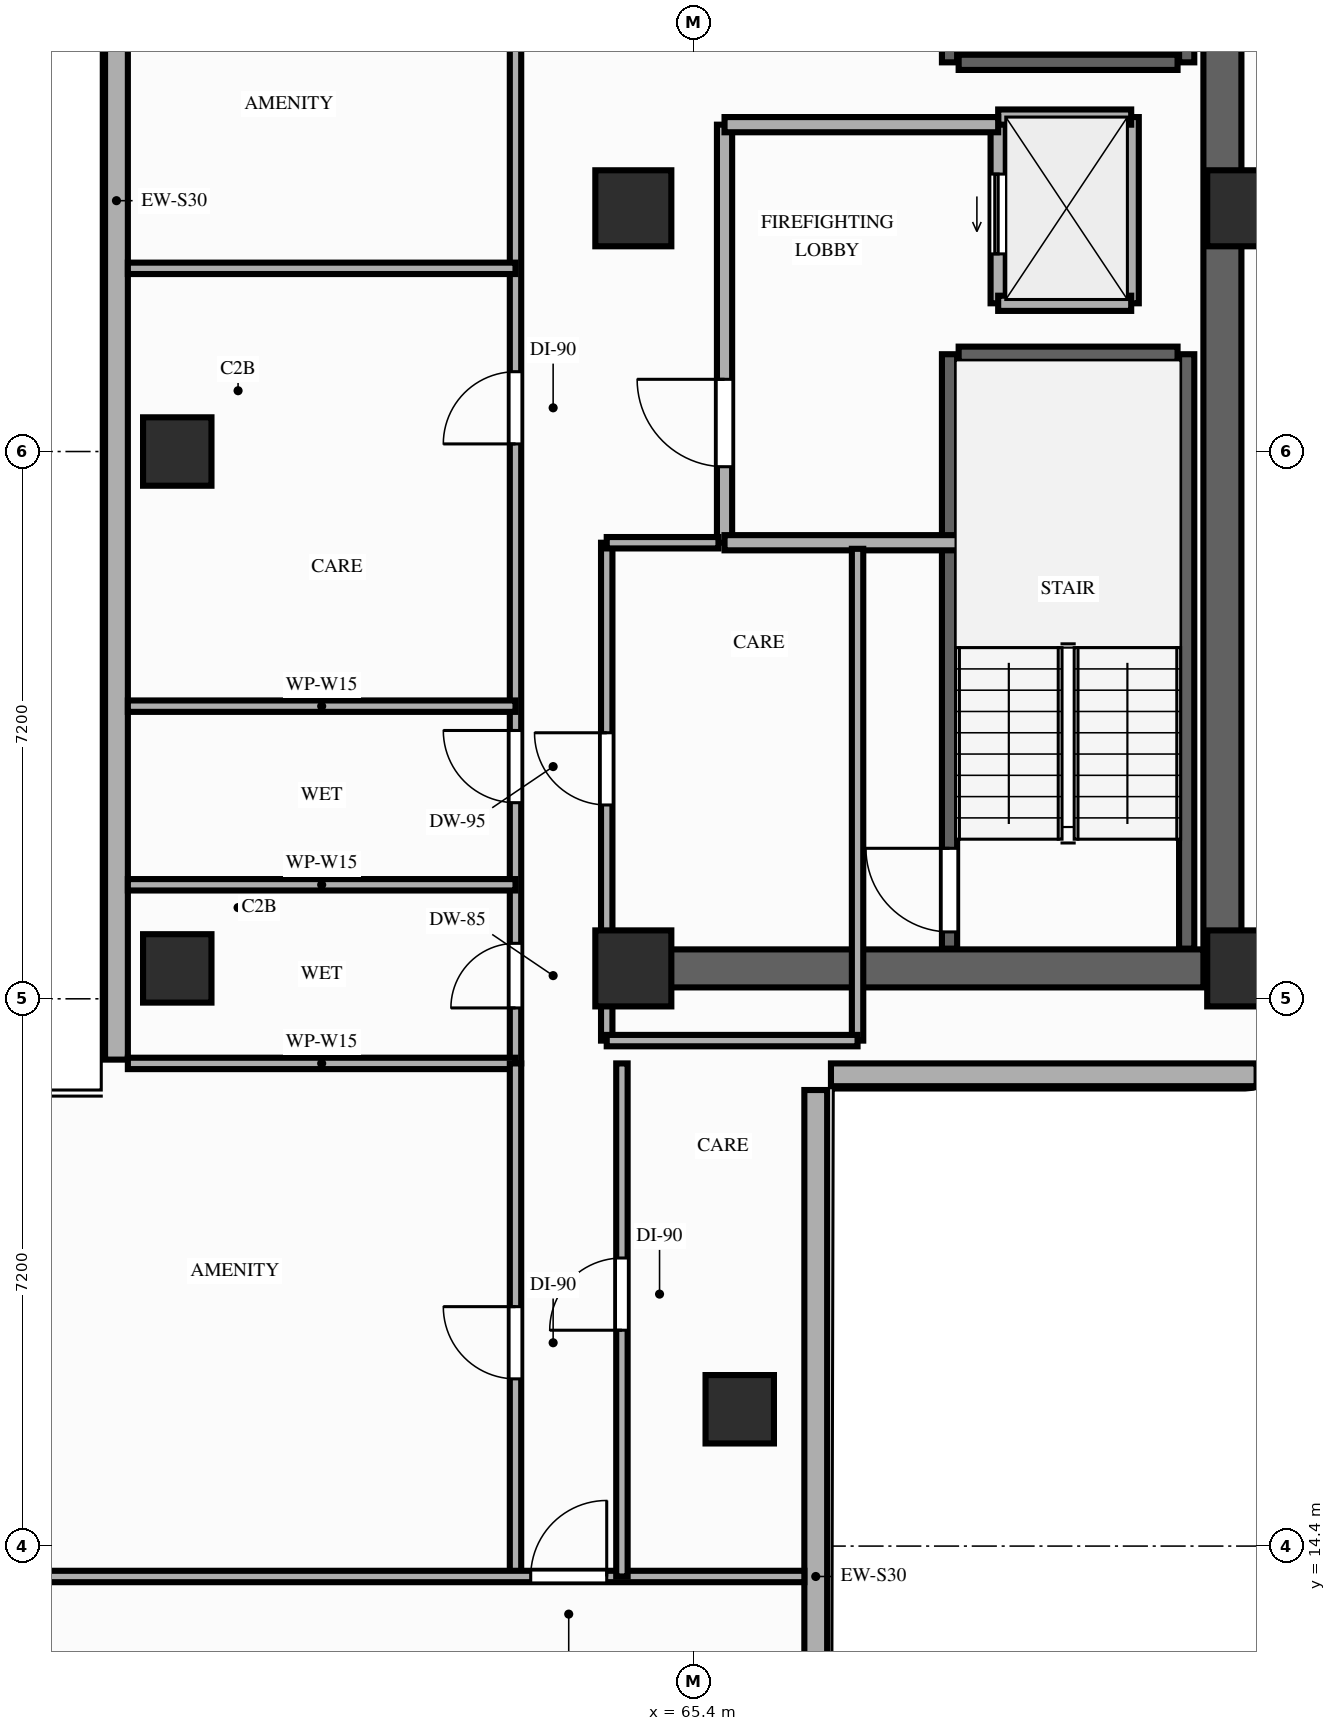
"""IFC4 building model, lengths in metres.
Left out: names, types, materials, properties, quantities, classifications, styles, units other than length and angle.
Written with IfcOpenShell. Run it as: python <this file> out.ifc"""

import sys

from ifc_helpers import new_model, si_unit, direction, frame, frame_2d, origin, origin_2d, place, context, subcontext, project, spatial, rectangle, extrude, element, fill, save


model = new_model("IFC4")
c1 = context("Model", 3, precision=1e-05, world=origin(), true_north=direction((0.0, 1.0)))
c2 = subcontext(c1, "Body", "Model", "MODEL_VIEW")
j1 = project(units=[si_unit("LENGTHUNIT", "METRE"), si_unit("PLANEANGLEUNIT", "RADIAN")], contexts=[c1])
p1 = place(None, origin())
s1 = spatial("IfcSite", under=j1, at=p1, CompositionType="ELEMENT")
p2 = place(p1, origin())
s2 = spatial("IfcBuilding", under=s1, at=p2, CompositionType="ELEMENT")
p3 = place(p2, frame((0.0, 0.0, 72.4)))
s3 = spatial("IfcBuildingStorey", under=s2, at=p3, CompositionType="ELEMENT", Elevation=72.4)
for number, where, z_axis, x_axis in (
    (1, (64.6, 22.0, 0.0), (0.0, 0.0, 1.0), (1.0, 0.0, 0.0)),
    (2, (72.65, 22.0, 0.0), (0.0, 0.0, 1.0), (1.0, 0.0, 0.0)),
    (3, (64.6, 32.0, 0.0), (0.0, 0.0, 1.0), (1.0, 0.0, 0.0)),
    (4, (72.65, 32.0, 0.0), (0.0, 0.0, 1.0), (1.0, 0.0, 0.0)),
):
    element("IfcColumn", number, at=place(p3, frame(where, z_axis=z_axis, x_axis=x_axis)), inside=s3, PredefinedType="COLUMN", context=c2, shape_type="SweptSolid", body=[
        extrude(rectangle(XDim=1.0, YDim=1.0, at=origin_2d()), origin(), (0.0, 0.0, 1.0), 3.2),
    ])
for number, where, z_axis, x_axis in (
    (5, (58.6, 22.0, 0.0), (0.0, 0.0, 1.0), (1.0, 0.0, 0.0)),
    (6, (58.6, 28.8, 0.0), (0.0, 0.0, 1.0), (1.0, 0.0, 0.0)),
    (7, (66.0, 16.2, 0.0), (0.0, 0.0, 1.0), (1.0, 0.0, 0.0)),
):
    element("IfcColumn", number, at=place(p3, frame(where, z_axis=z_axis, x_axis=x_axis)), inside=s3, PredefinedType="COLUMN", context=c2, shape_type="SweptSolid", body=[
        extrude(rectangle(XDim=0.9, YDim=0.9, at=origin_2d()), origin(), (0.0, 0.0, 1.0), 3.2),
    ])
p4 = place(p3, frame((57.8, 43.4, 0.0), z_axis=(0.0, 0.0, 1.0), x_axis=(0.0, -1.0, 0.0)))
e8 = element("IfcWall", 8, at=p4, inside=s3, PredefinedType="STANDARD", context=c2, shape_type="SweptSolid", body=[
    extrude(rectangle(XDim=22.6, YDim=0.3, at=frame_2d((11.3, 0.0))), origin(), (0.0, 0.0, 1.0), 2.54),
])
p5 = place(p3, frame((67.0, 7.6, 0.0), z_axis=(0.0, 0.0, 1.0), x_axis=(0.0, 1.0, 0.0)))
e9 = element("IfcWall", 9, at=p5, inside=s3, PredefinedType="STANDARD", context=c2, shape_type="SweptSolid", body=[
    extrude(rectangle(XDim=12.8, YDim=0.3, at=frame_2d((6.4, 0.0))), origin(), (0.0, 0.0, 1.0), 2.96),
])
p6 = place(p3, frame((67.2, 20.6, 0.0), z_axis=(0.0, 0.0, 1.0), x_axis=(1.0, 0.0, 0.0)))
e10 = element("IfcWall", 10, at=p6, inside=s3, PredefinedType="STANDARD", context=c2, shape_type="SweptSolid", body=[
    extrude(rectangle(XDim=5.6, YDim=0.3, at=frame_2d((2.8, 0.0))), origin(), (0.0, 0.0, 1.0), 2.96),
])
p7 = place(p3, frame((72.35, 22.0, 0.0), z_axis=(0.0, 0.0, 1.0), x_axis=(0.0, 1.0, 0.0)))
e11 = element("IfcWall", 11, at=p7, inside=s3, PredefinedType="SHEAR", context=c2, shape_type="SweptSolid", body=[
    extrude(rectangle(XDim=20.25, YDim=0.5, at=frame_2d((10.125, 0.0))), origin(), (0.0, 0.0, 1.0), 2.96),
])
p8 = place(p3, frame((64.6, 22.0, 0.0), z_axis=(0.0, 0.0, 1.0), x_axis=(1.0, 0.0, 0.0)))
e12 = element("IfcWall", 12, at=p8, inside=s3, PredefinedType="SHEAR", context=c2, shape_type="SweptSolid", body=[
    extrude(rectangle(XDim=7.5, YDim=0.5, at=frame_2d((3.75, 0.0))), origin(), (0.0, 0.0, 1.0), 2.96),
])
p9 = place(p3, frame((68.76, 22.26, 0.0), z_axis=(0.0, 0.0, 1.0), x_axis=(0.0, 1.0, 0.0)))
e13 = element("IfcWall", 13, at=p9, inside=s3, PredefinedType="SHEAR", context=c2, shape_type="SweptSolid", body=[
    extrude(rectangle(XDim=7.82, YDim=0.2, at=frame_2d((3.91, 0.0))), origin(), (0.0, 0.0, 1.0), 2.96),
])
p10 = place(p9, frame((0.22, 0.0, 0.0)))
e14 = element("IfcOpeningElement", 14, at=p10, cuts=e13, PredefinedType="OPENING", context=c2, shape_type="SweptSolid", body=[
    extrude(rectangle(XDim=1.1, YDim=2.15, at=frame_2d((0.55, 1.075))), frame((0.0, 0.11, 0.0), z_axis=(0.0, -1.0, 0.0), x_axis=(1.0, 0.0, 0.0)), (0.0, 0.0, 1.0), 0.22),
])
p11 = place(p3, frame((71.88, 22.26, 0.0), z_axis=(0.0, 0.0, 1.0), x_axis=(0.0, 1.0, 0.0)))
e15 = element("IfcWall", 15, at=p11, inside=s3, PredefinedType="SHEAR", context=c2, shape_type="SweptSolid", body=[
    extrude(rectangle(XDim=7.82, YDim=0.2, at=frame_2d((3.91, 0.0))), origin(), (0.0, 0.0, 1.0), 2.96),
])
p12 = place(p3, frame((68.88, 30.08, 0.0), z_axis=(0.0, 0.0, 1.0), x_axis=(1.0, 0.0, 0.0)))
e16 = element("IfcWall", 16, at=p12, inside=s3, PredefinedType="SHEAR", context=c2, shape_type="SweptSolid", body=[
    extrude(rectangle(XDim=2.88, YDim=0.2, at=frame_2d((1.44, 0.0))), origin(), (0.0, 0.0, 1.0), 2.96),
])
p13 = place(p3, frame((68.76, 33.92, 0.0), z_axis=(0.0, 0.0, 1.0), x_axis=(0.0, 1.0, 0.0)))
e17 = element("IfcWall", 17, at=p13, inside=s3, PredefinedType="SHEAR", context=c2, shape_type="SweptSolid", body=[
    extrude(rectangle(XDim=7.96, YDim=0.2, at=frame_2d((3.98, 0.0))), origin(), (0.0, 0.0, 1.0), 2.96),
])
p14 = place(p13, frame((0.22, 0.0, 0.0)))
e18 = element("IfcOpeningElement", 18, at=p14, cuts=e17, PredefinedType="OPENING", context=c2, shape_type="SweptSolid", body=[
    extrude(rectangle(XDim=1.1, YDim=2.15, at=frame_2d((0.55, 1.075))), frame((0.0, 0.11, 0.0), z_axis=(0.0, -1.0, 0.0), x_axis=(1.0, 0.0, 0.0)), (0.0, 0.0, 1.0), 0.22),
])
p15 = place(p3, frame((71.88, 33.92, 0.0), z_axis=(0.0, 0.0, 1.0), x_axis=(0.0, 1.0, 0.0)))
e19 = element("IfcWall", 19, at=p15, inside=s3, PredefinedType="SHEAR", context=c2, shape_type="SweptSolid", body=[
    extrude(rectangle(XDim=7.96, YDim=0.2, at=frame_2d((3.98, 0.0))), origin(), (0.0, 0.0, 1.0), 2.96),
])
p16 = place(p3, frame((68.88, 33.92, 0.0), z_axis=(0.0, 0.0, 1.0), x_axis=(1.0, 0.0, 0.0)))
e20 = element("IfcWall", 20, at=p16, inside=s3, PredefinedType="SHEAR", context=c2, shape_type="SweptSolid", body=[
    extrude(rectangle(XDim=2.88, YDim=0.2, at=frame_2d((1.44, 0.0))), origin(), (0.0, 0.0, 1.0), 2.96),
])
p17 = place(p3, frame((69.4, 30.75, 0.0), z_axis=(0.0, 0.0, 1.0), x_axis=(0.0, 1.0, 0.0)))
e21 = element("IfcWall", 21, at=p17, inside=s3, PredefinedType="MOVABLE", context=c2, shape_type="SweptSolid", body=[
    extrude(rectangle(XDim=2.45, YDim=0.2, at=frame_2d((1.225, 0.0))), origin(), (0.0, 0.0, 1.0), 2.96),
])
p18 = place(p17, frame((0.65, 0.0, 0.0)))
e22 = element("IfcOpeningElement", 22, at=p18, cuts=e21, PredefinedType="OPENING", context=c2, shape_type="SweptSolid", body=[
    extrude(rectangle(XDim=1.05, YDim=2.15, at=frame_2d((0.525, 1.075))), frame((0.0, 0.11, 0.0), z_axis=(0.0, -1.0, 0.0), x_axis=(1.0, 0.0, 0.0)), (0.0, 0.0, 1.0), 0.22),
])
p19 = place(p3, frame((71.15, 30.75, 0.0), z_axis=(0.0, 0.0, 1.0), x_axis=(0.0, 1.0, 0.0)))
e23 = element("IfcWall", 23, at=p19, inside=s3, PredefinedType="MOVABLE", context=c2, shape_type="SweptSolid", body=[
    extrude(rectangle(XDim=2.45, YDim=0.2, at=frame_2d((1.225, 0.0))), origin(), (0.0, 0.0, 1.0), 2.96),
])
for number, where, z_axis, x_axis in (
    (24, (69.4, 33.2, 0.0), (0.0, 0.0, 1.0), (1.0, 0.0, 0.0)),
    (25, (69.4, 30.75, 0.0), (0.0, 0.0, 1.0), (1.0, 0.0, 0.0)),
):
    element("IfcWall", number, at=place(p3, frame(where, z_axis=z_axis, x_axis=x_axis)), inside=s3, PredefinedType="MOVABLE", context=c2, shape_type="SweptSolid", body=[
        extrude(rectangle(XDim=1.75, YDim=0.2, at=frame_2d((0.875, 0.0))), origin(), (0.0, 0.0, 1.0), 2.96),
    ])
p20 = place(p3, frame((65.8, 27.6, 0.0), z_axis=(0.0, 0.0, 1.0), x_axis=(0.0, 1.0, 0.0)))
e26 = element("IfcWall", 26, at=p20, inside=s3, PredefinedType="PARTITIONING", context=c2, shape_type="SweptSolid", body=[
    extrude(rectangle(XDim=5.5, YDim=0.2, at=frame_2d((2.75, 0.0))), origin(), (0.0, 0.0, 1.0), 2.96),
])
p21 = place(p20, frame((1.0, 0.0, 0.0)))
e27 = element("IfcOpeningElement", 27, at=p21, cuts=e26, PredefinedType="OPENING", context=c2, shape_type="SweptSolid", body=[
    extrude(rectangle(XDim=1.15, YDim=2.15, at=frame_2d((0.575, 1.075))), frame((0.0, 0.11, 0.0), z_axis=(0.0, -1.0, 0.0), x_axis=(1.0, 0.0, 0.0)), (0.0, 0.0, 1.0), 0.22),
])
p22 = place(p3, frame((65.8, 33.1, 0.0), z_axis=(0.0, 0.0, 1.0), x_axis=(1.0, 0.0, 0.0)))
e28 = element("IfcWall", 28, at=p22, inside=s3, PredefinedType="PARTITIONING", context=c2, shape_type="SweptSolid", body=[
    extrude(rectangle(XDim=3.6, YDim=0.2, at=frame_2d((1.8, 0.0))), origin(), (0.0, 0.0, 1.0), 2.96),
])
p23 = place(p3, frame((65.8, 27.6, 0.0), z_axis=(0.0, 0.0, 1.0), x_axis=(1.0, 0.0, 0.0)))
e29 = element("IfcWall", 29, at=p23, inside=s3, PredefinedType="PARTITIONING", context=c2, shape_type="SweptSolid", body=[
    extrude(rectangle(XDim=3.4, YDim=0.2, at=frame_2d((1.7, 0.0))), origin(), (0.0, 0.0, 1.0), 2.96),
])
p24 = place(p3, frame((64.25, 21.05, 0.0), z_axis=(0.0, 0.0, 1.0), x_axis=(0.0, 1.0, 0.0)))
e30 = element("IfcWall", 30, at=p24, inside=s3, PredefinedType="PARTITIONING", context=c2, shape_type="SweptSolid", body=[
    extrude(rectangle(XDim=6.55, YDim=0.15, at=frame_2d((3.275, 0.0))), origin(), (0.0, 0.0, 1.0), 2.54),
])
p25 = place(p24, frame((3.1, 0.0, 0.0)))
e31 = element("IfcOpeningElement", 31, at=p25, cuts=e30, PredefinedType="OPENING", context=c2, shape_type="SweptSolid", body=[
    extrude(rectangle(XDim=0.95, YDim=2.15, at=frame_2d((0.475, 1.075))), frame((0.0, 0.085, 0.0), z_axis=(0.0, -1.0, 0.0), x_axis=(1.0, 0.0, 0.0)), (0.0, 0.0, 1.0), 0.17),
])
p26 = place(p3, frame((67.55, 21.05, 0.0), z_axis=(0.0, 0.0, 1.0), x_axis=(0.0, 1.0, 0.0)))
e32 = element("IfcWall", 32, at=p26, inside=s3, PredefinedType="PARTITIONING", context=c2, shape_type="SweptSolid", body=[
    extrude(rectangle(XDim=6.47, YDim=0.15, at=frame_2d((3.235, 0.0))), origin(), (0.0, 0.0, 1.0), 2.54),
])
p27 = place(p3, frame((64.25, 21.05, 0.0), z_axis=(0.0, 0.0, 1.0), x_axis=(1.0, 0.0, 0.0)))
e33 = element("IfcWall", 33, at=p27, inside=s3, PredefinedType="PARTITIONING", context=c2, shape_type="SweptSolid", body=[
    extrude(rectangle(XDim=3.3, YDim=0.15, at=frame_2d((1.65, 0.0))), origin(), (0.0, 0.0, 1.0), 2.54),
])
p28 = place(p3, frame((64.25, 27.6, 0.0), z_axis=(0.0, 0.0, 1.0), x_axis=(1.0, 0.0, 0.0)))
e34 = element("IfcWall", 34, at=p28, inside=s3, PredefinedType="PARTITIONING", context=c2, shape_type="SweptSolid", body=[
    extrude(rectangle(XDim=1.47, YDim=0.15, at=frame_2d((0.735, 0.0))), origin(), (0.0, 0.0, 1.0), 2.54),
])
p29 = place(p3, frame((63.05, 20.75, 0.0), z_axis=(0.0, 0.0, 1.0), x_axis=(0.0, 1.0, 0.0)))
e35 = element("IfcWall", 35, at=p29, inside=s3, PredefinedType="PARTITIONING", context=c2, shape_type="SweptSolid", body=[
    extrude(rectangle(XDim=22.7, YDim=0.15, at=frame_2d((11.35, 0.0))), origin(), (0.0, 0.0, 1.0), 2.54),
])
p30 = place(p29, frame((0.73, 0.0, 0.0)))
e36 = element("IfcOpeningElement", 36, at=p30, cuts=e35, PredefinedType="OPENING", context=c2, shape_type="SweptSolid", body=[
    extrude(rectangle(XDim=0.85, YDim=2.1, at=frame_2d((0.425, 1.05))), frame((0.0, 0.085, 0.0), z_axis=(0.0, -1.0, 0.0), x_axis=(1.0, 0.0, 0.0)), (0.0, 0.0, 1.0), 0.17),
])
p31 = place(p29, frame((3.43, 0.0, 0.0)))
e37 = element("IfcOpeningElement", 37, at=p31, cuts=e35, PredefinedType="OPENING", context=c2, shape_type="SweptSolid", body=[
    extrude(rectangle(XDim=0.95, YDim=2.1, at=frame_2d((0.475, 1.05))), frame((0.0, 0.085, 0.0), z_axis=(0.0, -1.0, 0.0), x_axis=(1.0, 0.0, 0.0)), (0.0, 0.0, 1.0), 0.17),
])
p32 = place(p29, frame((8.15, 0.0, 0.0)))
e38 = element("IfcOpeningElement", 38, at=p32, cuts=e35, PredefinedType="OPENING", context=c2, shape_type="SweptSolid", body=[
    extrude(rectangle(XDim=0.95, YDim=2.15, at=frame_2d((0.475, 1.075))), frame((0.0, 0.085, 0.0), z_axis=(0.0, -1.0, 0.0), x_axis=(1.0, 0.0, 0.0)), (0.0, 0.0, 1.0), 0.17),
])
p33 = place(p29, frame((13.67, 0.0, 0.0)))
e39 = element("IfcOpeningElement", 39, at=p33, cuts=e35, PredefinedType="OPENING", context=c2, shape_type="SweptSolid", body=[
    extrude(rectangle(XDim=0.95, YDim=2.15, at=frame_2d((0.475, 1.075))), frame((0.0, 0.085, 0.0), z_axis=(0.0, -1.0, 0.0), x_axis=(1.0, 0.0, 0.0)), (0.0, 0.0, 1.0), 0.17),
])
p34 = place(p29, frame((19.47, 0.0, 0.0)))
e40 = element("IfcOpeningElement", 40, at=p34, cuts=e35, PredefinedType="OPENING", context=c2, shape_type="SweptSolid", body=[
    extrude(rectangle(XDim=0.95, YDim=2.15, at=frame_2d((0.475, 1.075))), frame((0.0, 0.085, 0.0), z_axis=(0.0, -1.0, 0.0), x_axis=(1.0, 0.0, 0.0)), (0.0, 0.0, 1.0), 0.17),
])
for number, where, z_axis, x_axis in (
    (41, (57.95, 20.75, 0.0), (0.0, 0.0, 1.0), (1.0, 0.0, 0.0)),
    (42, (57.95, 23.1, 0.0), (0.0, 0.0, 1.0), (1.0, 0.0, 0.0)),
    (43, (57.95, 25.45, 0.0), (0.0, 0.0, 1.0), (1.0, 0.0, 0.0)),
    (44, (57.95, 31.21, 0.0), (0.0, 0.0, 1.0), (1.0, 0.0, 0.0)),
):
    element("IfcWall", number, at=place(p3, frame(where, z_axis=z_axis, x_axis=x_axis)), inside=s3, PredefinedType="PARTITIONING", context=c2, shape_type="SweptSolid", body=[
        extrude(rectangle(XDim=5.1, YDim=0.15, at=frame_2d((2.55, 0.0))), origin(), (0.0, 0.0, 1.0), 2.54),
    ])
p35 = place(p3, frame((63.05, 14.0, 0.0), z_axis=(0.0, 0.0, 1.0), x_axis=(0.0, 1.0, 0.0)))
e45 = element("IfcWall", 45, at=p35, inside=s3, PredefinedType="PARTITIONING", context=c2, shape_type="SweptSolid", body=[
    extrude(rectangle(XDim=6.75, YDim=0.15, at=frame_2d((3.375, 0.0))), origin(), (0.0, 0.0, 1.0), 2.54),
])
p36 = place(p35, frame((2.6, 0.0, 0.0)))
e46 = element("IfcOpeningElement", 46, at=p36, cuts=e45, PredefinedType="OPENING", context=c2, shape_type="SweptSolid", body=[
    extrude(rectangle(XDim=0.95, YDim=2.15, at=frame_2d((0.475, 1.075))), frame((0.0, 0.085, 0.0), z_axis=(0.0, -1.0, 0.0), x_axis=(1.0, 0.0, 0.0)), (0.0, 0.0, 1.0), 0.17),
])
p37 = place(p3, frame((55.55, 14.0, 0.0), z_axis=(0.0, 0.0, 1.0), x_axis=(1.0, 0.0, 0.0)))
e47 = element("IfcWall", 47, at=p37, inside=s3, PredefinedType="PARTITIONING", context=c2, shape_type="SweptSolid", body=[
    extrude(rectangle(XDim=11.3, YDim=0.15, at=frame_2d((5.65, 0.0))), origin(), (0.0, 0.0, 1.0), 2.54),
])
p38 = place(p37, frame((7.7, 0.0, 0.0)))
e48 = element("IfcOpeningElement", 48, at=p38, cuts=e47, PredefinedType="OPENING", context=c2, shape_type="SweptSolid", body=[
    extrude(rectangle(XDim=1.0, YDim=2.15, at=frame_2d((0.5, 1.075))), frame((0.0, 0.085, 0.0), z_axis=(0.0, -1.0, 0.0), x_axis=(1.0, 0.0, 0.0)), (0.0, 0.0, 1.0), 0.17),
])
p39 = place(p3, frame((64.45, 14.0, 0.0), z_axis=(0.0, 0.0, 1.0), x_axis=(0.0, 1.0, 0.0)))
e49 = element("IfcWall", 49, at=p39, inside=s3, PredefinedType="PARTITIONING", context=c2, shape_type="SweptSolid", body=[
    extrude(rectangle(XDim=6.75, YDim=0.15, at=frame_2d((3.375, 0.0))), origin(), (0.0, 0.0, 1.0), 2.54),
])
p40 = place(p39, frame((3.24, 0.0, 0.0)))
e50 = element("IfcOpeningElement", 50, at=p40, cuts=e49, PredefinedType="OPENING", context=c2, shape_type="SweptSolid", body=[
    extrude(rectangle(XDim=0.95, YDim=2.15, at=frame_2d((0.475, 1.075))), frame((0.0, 0.085, 0.0), z_axis=(0.0, -1.0, 0.0), x_axis=(1.0, 0.0, 0.0)), (0.0, 0.0, 1.0), 0.17),
])
p41 = place(p10, origin())
e51 = element("IfcDoor", 51, at=p41, inside=s3, OperationType="SINGLE_SWING_RIGHT", PredefinedType="DOOR", context=c2, shape_type="SweptSolid", body=[
    extrude(rectangle(XDim=1.1, YDim=2.15, at=frame_2d((0.55, 1.075))), frame((0.0, 0.025, 0.0), z_axis=(0.0, -1.0, 0.0), x_axis=(1.0, 0.0, 0.0)), (0.0, 0.0, 1.0), 0.05),
])
fill(e14, e51)
p42 = place(p18, origin())
e52 = element("IfcDoor", 52, at=p42, inside=s3, OperationType="SLIDING_TO_LEFT", PredefinedType="DOOR", context=c2, shape_type="SweptSolid", body=[
    extrude(rectangle(XDim=1.05, YDim=2.15, at=frame_2d((0.525, 1.075))), frame((0.0, 0.025, 0.0), z_axis=(0.0, -1.0, 0.0), x_axis=(1.0, 0.0, 0.0)), (0.0, 0.0, 1.0), 0.05),
])
fill(e22, e52)
p43 = place(p21, origin())
e53 = element("IfcDoor", 53, at=p43, inside=s3, OperationType="SINGLE_SWING_RIGHT", PredefinedType="DOOR", context=c2, shape_type="SweptSolid", body=[
    extrude(rectangle(XDim=1.15, YDim=2.15, at=frame_2d((0.575, 1.075))), frame((0.0, 0.025, 0.0), z_axis=(0.0, -1.0, 0.0), x_axis=(1.0, 0.0, 0.0)), (0.0, 0.0, 1.0), 0.05),
])
fill(e27, e53)
p44 = place(p25, origin())
e54 = element("IfcDoor", 54, at=p44, inside=s3, OperationType="SINGLE_SWING_RIGHT", PredefinedType="DOOR", context=c2, shape_type="SweptSolid", body=[
    extrude(rectangle(XDim=0.95, YDim=2.15, at=frame_2d((0.475, 1.075))), frame((0.0, 0.025, 0.0), z_axis=(0.0, -1.0, 0.0), x_axis=(1.0, 0.0, 0.0)), (0.0, 0.0, 1.0), 0.05),
])
fill(e31, e54)
p45 = place(p30, origin())
e55 = element("IfcDoor", 55, at=p45, inside=s3, OperationType="SINGLE_SWING_LEFT", PredefinedType="DOOR", context=c2, shape_type="SweptSolid", body=[
    extrude(rectangle(XDim=0.85, YDim=2.1, at=frame_2d((0.425, 1.05))), frame((0.0, 0.025, 0.0), z_axis=(0.0, -1.0, 0.0), x_axis=(1.0, 0.0, 0.0)), (0.0, 0.0, 1.0), 0.05),
])
fill(e36, e55)
p46 = place(p31, origin())
e56 = element("IfcDoor", 56, at=p46, inside=s3, OperationType="SINGLE_SWING_RIGHT", PredefinedType="DOOR", context=c2, shape_type="SweptSolid", body=[
    extrude(rectangle(XDim=0.95, YDim=2.1, at=frame_2d((0.475, 1.05))), frame((0.0, 0.025, 0.0), z_axis=(0.0, -1.0, 0.0), x_axis=(1.0, 0.0, 0.0)), (0.0, 0.0, 1.0), 0.05),
])
fill(e37, e56)
p47 = place(p32, origin())
e57 = element("IfcDoor", 57, at=p47, inside=s3, OperationType="SINGLE_SWING_LEFT", PredefinedType="DOOR", context=c2, shape_type="SweptSolid", body=[
    extrude(rectangle(XDim=0.95, YDim=2.15, at=frame_2d((0.475, 1.075))), frame((0.0, 0.025, 0.0), z_axis=(0.0, -1.0, 0.0), x_axis=(1.0, 0.0, 0.0)), (0.0, 0.0, 1.0), 0.05),
])
fill(e38, e57)
p48 = place(p36, origin())
e58 = element("IfcDoor", 58, at=p48, inside=s3, OperationType="SINGLE_SWING_RIGHT", PredefinedType="DOOR", context=c2, shape_type="SweptSolid", body=[
    extrude(rectangle(XDim=0.95, YDim=2.15, at=frame_2d((0.475, 1.075))), frame((0.0, 0.025, 0.0), z_axis=(0.0, -1.0, 0.0), x_axis=(1.0, 0.0, 0.0)), (0.0, 0.0, 1.0), 0.05),
])
fill(e46, e58)
p49 = place(p40, origin())
e59 = element("IfcDoor", 59, at=p49, inside=s3, OperationType="SINGLE_SWING_LEFT", PredefinedType="DOOR", context=c2, shape_type="SweptSolid", body=[
    extrude(rectangle(XDim=0.95, YDim=2.15, at=frame_2d((0.475, 1.075))), frame((0.0, 0.025, 0.0), z_axis=(0.0, -1.0, 0.0), x_axis=(1.0, 0.0, 0.0)), (0.0, 0.0, 1.0), 0.05),
])
fill(e50, e59)
p50 = place(p38, origin())
e60 = element("IfcDoor", 60, at=p50, inside=s3, OperationType="SINGLE_SWING_RIGHT", PredefinedType="DOOR", context=c2, shape_type="SweptSolid", body=[
    extrude(rectangle(XDim=1.0, YDim=2.15, at=frame_2d((0.5, 1.075))), frame((0.0, 0.025, 0.0), z_axis=(0.0, -1.0, 0.0), x_axis=(1.0, 0.0, 0.0)), (0.0, 0.0, 1.0), 0.05),
])
fill(e48, e60)
save(model, sys.argv[1])
